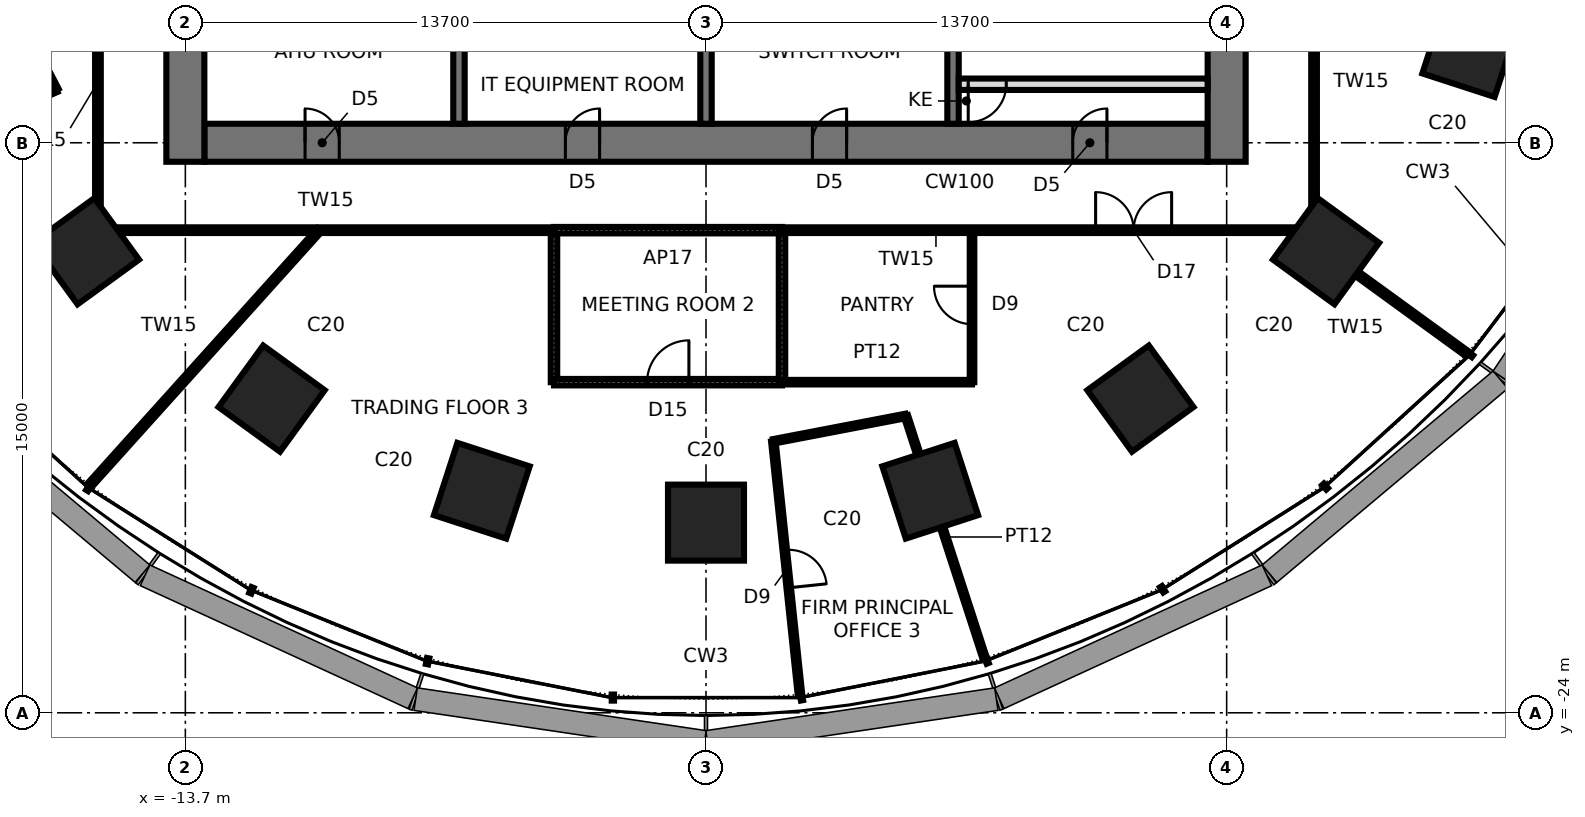
"""IFC4 building model, lengths in metres.
Left out: names, types, materials, properties, quantities, classifications, styles, units other than length and angle.
Written with IfcOpenShell. Run it as: python <this file> out.ifc"""

import sys

from ifc_helpers import new_model, si_unit, direction, frame, frame_2d, origin, origin_2d, place, context, subcontext, project, spatial, rectangle, extrude, element, fill, save


model = new_model("IFC4")
c1 = context("Model", 3, precision=1e-05, world=origin(), true_north=direction((0.0, 1.0)))
c2 = subcontext(c1, "Body", "Model", "MODEL_VIEW")
j1 = project(units=[si_unit("LENGTHUNIT", "METRE"), si_unit("PLANEANGLEUNIT", "RADIAN")], contexts=[c1])
p1 = place(None, origin())
s1 = spatial("IfcSite", under=j1, at=p1, CompositionType="ELEMENT")
p2 = place(p1, origin())
s2 = spatial("IfcBuilding", under=s1, at=p2, CompositionType="ELEMENT")
p3 = place(p2, frame((0.0, 0.0, 65.8)))
s3 = spatial("IfcBuildingStorey", under=s2, at=p3, CompositionType="ELEMENT", Elevation=65.8)
for number, where, z_axis, x_axis in (
    (1, (-16.315, -11.854, 0.0), (0.0, 0.0, 1.0), (-0.809, -0.588, 0.0)),
    (2, (-11.43, -15.733, 0.0), (0.0, 0.0, 1.0), (-0.588, -0.809, 0.0)),
    (3, (-5.9, -18.157, 0.0), (0.0, 0.0, 1.0), (-0.309, -0.951, 0.0)),
    (4, (0.0, -18.996, 0.0), (0.0, 0.0, 1.0), (0.0, -1.0, 0.0)),
    (5, (5.9, -18.157, 0.0), (0.0, 0.0, 1.0), (0.309, -0.951, 0.0)),
    (6, (11.43, -15.733, 0.0), (0.0, 0.0, 1.0), (0.588, -0.809, 0.0)),
    (7, (16.315, -11.854, 0.0), (0.0, 0.0, 1.0), (0.809, -0.588, 0.0)),
    (8, (20.109, -6.534, 0.0), (0.0, 0.0, 1.0), (0.951, -0.309, 0.0)),
):
    element("IfcColumn", number, at=place(p3, frame(where, z_axis=z_axis, x_axis=x_axis)), inside=s3, PredefinedType="COLUMN", context=c2, shape_type="SweptSolid", body=[
        extrude(rectangle(XDim=2.0, YDim=2.0, at=origin_2d()), origin(), (0.0, 0.0, 1.0), 4.2),
    ])
p4 = place(p3, frame((-13.2, -9.0, 0.0), z_axis=(0.0, 0.0, 1.0), x_axis=(1.0, 0.0, 0.0)))
e9 = element("IfcWall", 9, at=p4, inside=s3, PredefinedType="SHEAR", context=c2, shape_type="SweptSolid", body=[
    extrude(rectangle(XDim=26.4, YDim=1.0, at=frame_2d((13.2, 0.0))), origin(), (0.0, 0.0, 1.0), 4.2),
])
p5 = place(p4, frame((2.65, 0.0, 0.0)))
e10 = element("IfcOpeningElement", 10, at=p5, cuts=e9, PredefinedType="OPENING", context=c2, shape_type="SweptSolid", body=[
    extrude(rectangle(XDim=0.9, YDim=2.1, at=frame_2d((0.45, 1.05))), frame((0.0, 0.51, 0.0), z_axis=(0.0, -1.0, 0.0), x_axis=(1.0, 0.0, 0.0)), (0.0, 0.0, 1.0), 1.02),
])
p6 = place(p4, frame((9.5, 0.0, 0.0)))
e11 = element("IfcOpeningElement", 11, at=p6, cuts=e9, PredefinedType="OPENING", context=c2, shape_type="SweptSolid", body=[
    extrude(rectangle(XDim=0.9, YDim=2.1, at=frame_2d((0.45, 1.05))), frame((0.0, 0.51, 0.0), z_axis=(0.0, -1.0, 0.0), x_axis=(1.0, 0.0, 0.0)), (0.0, 0.0, 1.0), 1.02),
])
p7 = place(p4, frame((16.0, 0.0, 0.0)))
e12 = element("IfcOpeningElement", 12, at=p7, cuts=e9, PredefinedType="OPENING", context=c2, shape_type="SweptSolid", body=[
    extrude(rectangle(XDim=0.9, YDim=2.1, at=frame_2d((0.45, 1.05))), frame((0.0, 0.51, 0.0), z_axis=(0.0, -1.0, 0.0), x_axis=(1.0, 0.0, 0.0)), (0.0, 0.0, 1.0), 1.02),
])
p8 = place(p4, frame((22.85, 0.0, 0.0)))
e13 = element("IfcOpeningElement", 13, at=p8, cuts=e9, PredefinedType="OPENING", context=c2, shape_type="SweptSolid", body=[
    extrude(rectangle(XDim=0.9, YDim=2.1, at=frame_2d((0.45, 1.05))), frame((0.0, 0.51, 0.0), z_axis=(0.0, -1.0, 0.0), x_axis=(1.0, 0.0, 0.0)), (0.0, 0.0, 1.0), 1.02),
])
p9 = place(p3, frame((13.7, -9.5, 0.0), z_axis=(0.0, 0.0, 1.0), x_axis=(0.0, 1.0, 0.0)))
e14 = element("IfcWall", 14, at=p9, inside=s3, PredefinedType="SHEAR", context=c2, shape_type="SweptSolid", body=[
    extrude(rectangle(XDim=19.0, YDim=1.0, at=frame_2d((9.5, 0.0))), origin(), (0.0, 0.0, 1.0), 4.2),
])
p10 = place(p9, frame((8.6, 0.0, 0.0)))
e15 = element("IfcOpeningElement", 15, at=p10, cuts=e14, PredefinedType="OPENING", context=c2, shape_type="SweptSolid", body=[
    extrude(rectangle(XDim=1.8, YDim=2.4, at=frame_2d((0.9, 1.2))), frame((0.0, 0.51, 0.0), z_axis=(0.0, -1.0, 0.0), x_axis=(1.0, 0.0, 0.0)), (0.0, 0.0, 1.0), 1.02),
])
p11 = place(p3, frame((-13.7, 9.5, 0.0), z_axis=(0.0, 0.0, 1.0), x_axis=(0.0, -1.0, 0.0)))
e16 = element("IfcWall", 16, at=p11, inside=s3, PredefinedType="SHEAR", context=c2, shape_type="SweptSolid", body=[
    extrude(rectangle(XDim=19.0, YDim=1.0, at=frame_2d((9.5, 0.0))), origin(), (0.0, 0.0, 1.0), 4.2),
])
p12 = place(p11, frame((8.6, 0.0, 0.0)))
e17 = element("IfcOpeningElement", 17, at=p12, cuts=e16, PredefinedType="OPENING", context=c2, shape_type="SweptSolid", body=[
    extrude(rectangle(XDim=1.8, YDim=2.4, at=frame_2d((0.9, 1.2))), frame((0.0, 0.51, 0.0), z_axis=(0.0, -1.0, 0.0), x_axis=(1.0, 0.0, 0.0)), (0.0, 0.0, 1.0), 1.02),
])
for number, where, z_axis, x_axis in (
    (18, (-6.5, -4.75, 0.0), (0.0, 0.0, 1.0), (0.0, -1.0, 0.0)),
    (19, (6.5, -4.75, 0.0), (0.0, 0.0, 1.0), (0.0, -1.0, 0.0)),
    (20, (0.0, -4.75, 0.0), (0.0, 0.0, 1.0), (0.0, -1.0, 0.0)),
):
    element("IfcWall", number, at=place(p3, frame(where, z_axis=z_axis, x_axis=x_axis)), inside=s3, PredefinedType="SHEAR", context=c2, shape_type="SweptSolid", body=[
        extrude(rectangle(XDim=3.75, YDim=0.3, at=frame_2d((1.875, 0.0))), origin(), (0.0, 0.0, 1.0), 4.2),
    ])
p13 = place(p3, frame((6.65, -7.46, 0.0), z_axis=(0.0, 0.0, 1.0), x_axis=(1.0, 0.0, 0.0)))
e21 = element("IfcWall", 21, at=p13, inside=s3, PredefinedType="PARTITIONING", context=c2, shape_type="SweptSolid", body=[
    extrude(rectangle(XDim=6.55, YDim=0.3, at=frame_2d((3.275, 0.0))), origin(), (0.0, 0.0, 1.0), 4.04),
])
p14 = place(p13, frame((0.25, 0.0, 0.0)))
e22 = element("IfcOpeningElement", 22, at=p14, cuts=e21, PredefinedType="OPENING", context=c2, shape_type="SweptSolid", body=[
    extrude(rectangle(XDim=1.0, YDim=2.4, at=frame_2d((0.5, 1.2))), frame((0.0, 0.16, 0.0), z_axis=(0.0, -1.0, 0.0), x_axis=(1.0, 0.0, 0.0)), (0.0, 0.0, 1.0), 0.32),
])
p15 = place(p3, frame((-17.087, -7.608, 0.0), z_axis=(0.0, 0.0, 1.0), x_axis=(-0.462175272874, 0.886788597775, 0.0)))
e23 = element("IfcWall", 23, at=p15, inside=s3, PredefinedType="PARTITIONING", context=c2, shape_type="SweptSolid", body=[
    extrude(rectangle(XDim=4.036, YDim=0.12, at=frame_2d((2.018, 0.0))), origin(), (0.0, 0.0, 1.0), 4.04),
])
p16 = place(p3, frame((-23.208, -10.333, 0.0), z_axis=(0.0, 0.0, 1.0), x_axis=(0.91354990356, 0.406726657235, 0.0)))
e24 = element("IfcWall", 24, at=p16, inside=s3, PredefinedType="PARTITIONING", context=c2, shape_type="SweptSolid", body=[
    extrude(rectangle(XDim=6.7, YDim=0.12, at=frame_2d((3.35, 0.0))), origin(), (0.0, 0.0, 1.0), 4.04),
])
p17 = place(p3, frame((-16.0, -3.5, 0.0), z_axis=(0.0, 0.0, 1.0), x_axis=(0.0, -1.0, 0.0)))
e25 = element("IfcWall", 25, at=p17, inside=s3, PredefinedType="PARTITIONING", context=c2, shape_type="SweptSolid", body=[
    extrude(rectangle(XDim=7.8, YDim=0.15, at=frame_2d((3.9, 0.0))), origin(), (0.0, 0.0, 1.0), 4.04),
])
p18 = place(p3, frame((-10.175, -11.3, 0.0), z_axis=(0.0, 0.0, 1.0), x_axis=(-0.669136564673, -0.743139460544, 0.0)))
e26 = element("IfcWall", 26, at=p18, inside=s3, PredefinedType="PARTITIONING", context=c2, shape_type="SweptSolid", body=[
    extrude(rectangle(XDim=9.026, YDim=0.15, at=frame_2d((4.513, 0.0))), origin(), (0.0, 0.0, 1.0), 4.04),
])
p19 = place(p3, frame((-16.0, -11.3, 0.0), z_axis=(0.0, 0.0, 1.0), x_axis=(1.0, 0.0, 0.0)))
e27 = element("IfcWall", 27, at=p19, inside=s3, PredefinedType="PARTITIONING", context=c2, shape_type="SweptSolid", body=[
    extrude(rectangle(XDim=12.0, YDim=0.15, at=frame_2d((6.0, 0.0))), origin(), (0.0, 0.0, 1.0), 4.04),
])
p20 = place(p3, frame((-4.0, -11.3, 0.0), z_axis=(0.0, 0.0, 1.0), x_axis=(0.0, -1.0, 0.0)))
e28 = element("IfcWall", 28, at=p20, inside=s3, PredefinedType="PARTITIONING", context=c2, shape_type="SweptSolid", body=[
    extrude(rectangle(XDim=4.0, YDim=0.17, at=frame_2d((2.0, 0.0))), origin(), (0.0, 0.0, 1.0), 4.04),
])
p21 = place(p3, frame((2.0, -11.3, 0.0), z_axis=(0.0, 0.0, 1.0), x_axis=(-1.0, 0.0, 0.0)))
e29 = element("IfcWall", 29, at=p21, inside=s3, PredefinedType="PARTITIONING", context=c2, shape_type="SweptSolid", body=[
    extrude(rectangle(XDim=6.0, YDim=0.17, at=frame_2d((3.0, 0.0))), origin(), (0.0, 0.0, 1.0), 4.04),
])
p22 = place(p3, frame((-4.0, -15.3, 0.0), z_axis=(0.0, 0.0, 1.0), x_axis=(1.0, 0.0, 0.0)))
e30 = element("IfcWall", 30, at=p22, inside=s3, PredefinedType="PARTITIONING", context=c2, shape_type="SweptSolid", body=[
    extrude(rectangle(XDim=6.0, YDim=0.17, at=frame_2d((3.0, 0.0))), origin(), (0.0, 0.0, 1.0), 3.586),
])
p23 = place(p22, frame((2.45, 0.0, 0.0)))
e31 = element("IfcOpeningElement", 31, at=p23, cuts=e30, PredefinedType="OPENING", context=c2, shape_type="SweptSolid", body=[
    extrude(rectangle(XDim=1.1, YDim=2.4, at=frame_2d((0.55, 1.2))), frame((0.0, 0.095, 0.0), z_axis=(0.0, -1.0, 0.0), x_axis=(1.0, 0.0, 0.0)), (0.0, 0.0, 1.0), 0.19),
])
p24 = place(p3, frame((1.772, -16.857, 0.0), z_axis=(0.0, 0.0, 1.0), x_axis=(0.104542522915, -0.994520417539, 0.0)))
e32 = element("IfcWall", 32, at=p24, inside=s3, PredefinedType="PARTITIONING", context=c2, shape_type="SweptSolid", body=[
    extrude(rectangle(XDim=6.7, YDim=0.12, at=frame_2d((3.35, 0.0))), origin(), (0.0, 0.0, 1.0), 4.04),
])
p25 = place(p24, frame((2.875, 0.0, 0.0)))
e33 = element("IfcOpeningElement", 33, at=p25, cuts=e32, PredefinedType="OPENING", context=c2, shape_type="SweptSolid", body=[
    extrude(rectangle(XDim=1.0, YDim=2.4, at=frame_2d((0.5, 1.2))), frame((0.0, 0.07, 0.0), z_axis=(0.0, -1.0, 0.0), x_axis=(1.0, 0.0, 0.0)), (0.0, 0.0, 1.0), 0.14),
])
p26 = place(p3, frame((2.0, -11.3, 0.0), z_axis=(0.0, 0.0, 1.0), x_axis=(0.0, -1.0, 0.0)))
e34 = element("IfcWall", 34, at=p26, inside=s3, PredefinedType="PARTITIONING", context=c2, shape_type="SweptSolid", body=[
    extrude(rectangle(XDim=4.0, YDim=0.17, at=frame_2d((2.0, 0.0))), origin(), (0.0, 0.0, 1.0), 4.04),
])
p27 = place(p3, frame((5.26, -16.188, 0.0), z_axis=(0.0, 0.0, 1.0), x_axis=(-0.982089213151, -0.188416499842, 0.0)))
e35 = element("IfcWall", 35, at=p27, inside=s3, PredefinedType="PARTITIONING", context=c2, shape_type="SweptSolid", body=[
    extrude(rectangle(XDim=3.552, YDim=0.12, at=frame_2d((1.776, 0.0))), origin(), (0.0, 0.0, 1.0), 4.04),
])
p28 = place(p3, frame((2.0, -15.3, 0.0), z_axis=(0.0, 0.0, 1.0), x_axis=(1.0, 0.0, 0.0)))
e36 = element("IfcWall", 36, at=p28, inside=s3, PredefinedType="PARTITIONING", context=c2, shape_type="SweptSolid", body=[
    extrude(rectangle(XDim=5.0, YDim=0.12, at=frame_2d((2.5, 0.0))), origin(), (0.0, 0.0, 1.0), 3.586),
])
p29 = place(p3, frame((7.33, -22.56, 0.0), z_axis=(0.0, 0.0, 1.0), x_axis=(-0.309003676349, 0.951060843481, 0.0)))
e37 = element("IfcWall", 37, at=p29, inside=s3, PredefinedType="PARTITIONING", context=c2, shape_type="SweptSolid", body=[
    extrude(rectangle(XDim=6.7, YDim=0.12, at=frame_2d((3.35, 0.0))), origin(), (0.0, 0.0, 1.0), 2.84),
])
p30 = place(p3, frame((7.0, -15.3, 0.0), z_axis=(0.0, 0.0, 1.0), x_axis=(0.0, 1.0, 0.0)))
e38 = element("IfcWall", 38, at=p30, inside=s3, PredefinedType="PARTITIONING", context=c2, shape_type="SweptSolid", body=[
    extrude(rectangle(XDim=4.0, YDim=0.12, at=frame_2d((2.0, 0.0))), origin(), (0.0, 0.0, 1.0), 4.04),
])
p31 = place(p30, frame((1.526, 0.0, 0.0)))
e39 = element("IfcOpeningElement", 39, at=p31, cuts=e38, PredefinedType="OPENING", context=c2, shape_type="SweptSolid", body=[
    extrude(rectangle(XDim=1.0, YDim=2.4, at=frame_2d((0.5, 1.2))), frame((0.0, 0.07, 0.0), z_axis=(0.0, -1.0, 0.0), x_axis=(1.0, 0.0, 0.0)), (0.0, 0.0, 1.0), 0.14),
])
p32 = place(p3, frame((2.0, -11.3, 0.0), z_axis=(0.0, 0.0, 1.0), x_axis=(1.0, 0.0, 0.0)))
e40 = element("IfcWall", 40, at=p32, inside=s3, PredefinedType="PARTITIONING", context=c2, shape_type="SweptSolid", body=[
    extrude(rectangle(XDim=14.0, YDim=0.15, at=frame_2d((7.0, 0.0))), origin(), (0.0, 0.0, 1.0), 4.04),
])
p33 = place(p32, frame((8.252, 0.0, 0.0)))
e41 = element("IfcOpeningElement", 41, at=p33, cuts=e40, PredefinedType="OPENING", context=c2, shape_type="SweptSolid", body=[
    extrude(rectangle(XDim=2.0, YDim=2.4, at=frame_2d((1.0, 1.2))), frame((0.0, 0.085, 0.0), z_axis=(0.0, -1.0, 0.0), x_axis=(1.0, 0.0, 0.0)), (0.0, 0.0, 1.0), 0.17),
])
p34 = place(p3, frame((15.553, -11.3, 0.0), z_axis=(0.0, 0.0, 1.0), x_axis=(0.809032304237, -0.587764179499, 0.0)))
e42 = element("IfcWall", 42, at=p34, inside=s3, PredefinedType="PARTITIONING", context=c2, shape_type="SweptSolid", body=[
    extrude(rectangle(XDim=5.522, YDim=0.15, at=frame_2d((2.761, 0.0))), origin(), (0.0, 0.0, 1.0), 2.84),
])
p35 = place(p3, frame((16.0, -11.3, 0.0), z_axis=(0.0, 0.0, 1.0), x_axis=(0.0, 1.0, 0.0)))
e43 = element("IfcWall", 43, at=p35, inside=s3, PredefinedType="PARTITIONING", context=c2, shape_type="SweptSolid", body=[
    extrude(rectangle(XDim=7.8, YDim=0.15, at=frame_2d((3.9, 0.0))), origin(), (0.0, 0.0, 1.0), 4.04),
])
p36 = place(p5, origin())
e44 = element("IfcDoor", 44, at=p36, inside=s3, OperationType="SINGLE_SWING_LEFT", PredefinedType="DOOR", context=c2, shape_type="SweptSolid", body=[
    extrude(rectangle(XDim=0.82, YDim=2.06, at=frame_2d((0.45, 1.03))), frame((0.0, 0.025, 0.0), z_axis=(0.0, -1.0, 0.0), x_axis=(1.0, 0.0, 0.0)), (0.0, 0.0, 1.0), 0.05),
    extrude(rectangle(XDim=0.04, YDim=2.1, at=frame_2d((0.02, 1.05))), frame((0.0, 0.25, 0.0), z_axis=(0.0, -1.0, 0.0), x_axis=(1.0, 0.0, 0.0)), (0.0, 0.0, 1.0), 0.5),
    extrude(rectangle(XDim=0.04, YDim=2.1, at=frame_2d((0.88, 1.05))), frame((0.0, 0.25, 0.0), z_axis=(0.0, -1.0, 0.0), x_axis=(1.0, 0.0, 0.0)), (0.0, 0.0, 1.0), 0.5),
    extrude(rectangle(XDim=0.82, YDim=0.04, at=frame_2d((0.45, 2.08))), frame((0.0, 0.25, 0.0), z_axis=(0.0, -1.0, 0.0), x_axis=(1.0, 0.0, 0.0)), (0.0, 0.0, 1.0), 0.5),
])
fill(e10, e44)
p37 = place(p6, origin())
e45 = element("IfcDoor", 45, at=p37, inside=s3, OperationType="SINGLE_SWING_RIGHT", PredefinedType="DOOR", context=c2, shape_type="SweptSolid", body=[
    extrude(rectangle(XDim=0.82, YDim=2.06, at=frame_2d((0.45, 1.03))), frame((0.0, 0.025, 0.0), z_axis=(0.0, -1.0, 0.0), x_axis=(1.0, 0.0, 0.0)), (0.0, 0.0, 1.0), 0.05),
    extrude(rectangle(XDim=0.04, YDim=2.1, at=frame_2d((0.02, 1.05))), frame((0.0, 0.25, 0.0), z_axis=(0.0, -1.0, 0.0), x_axis=(1.0, 0.0, 0.0)), (0.0, 0.0, 1.0), 0.5),
    extrude(rectangle(XDim=0.04, YDim=2.1, at=frame_2d((0.88, 1.05))), frame((0.0, 0.25, 0.0), z_axis=(0.0, -1.0, 0.0), x_axis=(1.0, 0.0, 0.0)), (0.0, 0.0, 1.0), 0.5),
    extrude(rectangle(XDim=0.82, YDim=0.04, at=frame_2d((0.45, 2.08))), frame((0.0, 0.25, 0.0), z_axis=(0.0, -1.0, 0.0), x_axis=(1.0, 0.0, 0.0)), (0.0, 0.0, 1.0), 0.5),
])
fill(e11, e45)
p38 = place(p7, origin())
e46 = element("IfcDoor", 46, at=p38, inside=s3, OperationType="SINGLE_SWING_RIGHT", PredefinedType="DOOR", context=c2, shape_type="SweptSolid", body=[
    extrude(rectangle(XDim=0.82, YDim=2.06, at=frame_2d((0.45, 1.03))), frame((0.0, 0.025, 0.0), z_axis=(0.0, -1.0, 0.0), x_axis=(1.0, 0.0, 0.0)), (0.0, 0.0, 1.0), 0.05),
    extrude(rectangle(XDim=0.04, YDim=2.1, at=frame_2d((0.02, 1.05))), frame((0.0, 0.25, 0.0), z_axis=(0.0, -1.0, 0.0), x_axis=(1.0, 0.0, 0.0)), (0.0, 0.0, 1.0), 0.5),
    extrude(rectangle(XDim=0.04, YDim=2.1, at=frame_2d((0.88, 1.05))), frame((0.0, 0.25, 0.0), z_axis=(0.0, -1.0, 0.0), x_axis=(1.0, 0.0, 0.0)), (0.0, 0.0, 1.0), 0.5),
    extrude(rectangle(XDim=0.82, YDim=0.04, at=frame_2d((0.45, 2.08))), frame((0.0, 0.25, 0.0), z_axis=(0.0, -1.0, 0.0), x_axis=(1.0, 0.0, 0.0)), (0.0, 0.0, 1.0), 0.5),
])
fill(e12, e46)
p39 = place(p8, origin())
e47 = element("IfcDoor", 47, at=p39, inside=s3, OperationType="SINGLE_SWING_RIGHT", PredefinedType="DOOR", context=c2, shape_type="SweptSolid", body=[
    extrude(rectangle(XDim=0.82, YDim=2.06, at=frame_2d((0.45, 1.03))), frame((0.0, 0.025, 0.0), z_axis=(0.0, -1.0, 0.0), x_axis=(1.0, 0.0, 0.0)), (0.0, 0.0, 1.0), 0.05),
    extrude(rectangle(XDim=0.04, YDim=2.1, at=frame_2d((0.02, 1.05))), frame((0.0, 0.25, 0.0), z_axis=(0.0, -1.0, 0.0), x_axis=(1.0, 0.0, 0.0)), (0.0, 0.0, 1.0), 0.5),
    extrude(rectangle(XDim=0.04, YDim=2.1, at=frame_2d((0.88, 1.05))), frame((0.0, 0.25, 0.0), z_axis=(0.0, -1.0, 0.0), x_axis=(1.0, 0.0, 0.0)), (0.0, 0.0, 1.0), 0.5),
    extrude(rectangle(XDim=0.82, YDim=0.04, at=frame_2d((0.45, 2.08))), frame((0.0, 0.25, 0.0), z_axis=(0.0, -1.0, 0.0), x_axis=(1.0, 0.0, 0.0)), (0.0, 0.0, 1.0), 0.5),
])
fill(e13, e47)
p40 = place(p14, frame((1.0, 0.0, 0.0), z_axis=(0.0, 0.0, 1.0), x_axis=(-1.0, 0.0, 0.0)))
e48 = element("IfcDoor", 48, at=p40, inside=s3, OperationType="SINGLE_SWING_RIGHT", PredefinedType="DOOR", context=c2, shape_type="SweptSolid", body=[
    extrude(rectangle(XDim=1.0, YDim=2.4, at=frame_2d((0.5, 1.2))), frame((0.0, 0.025, 0.0), z_axis=(0.0, -1.0, 0.0), x_axis=(1.0, 0.0, 0.0)), (0.0, 0.0, 1.0), 0.05),
])
fill(e22, e48)
p41 = place(p25, origin())
e49 = element("IfcDoor", 49, at=p41, inside=s3, OperationType="SINGLE_SWING_RIGHT", PredefinedType="DOOR", context=c2, shape_type="SweptSolid", body=[
    extrude(rectangle(XDim=1.0, YDim=2.4, at=frame_2d((0.5, 1.2))), frame((0.0, 0.025, 0.0), z_axis=(0.0, -1.0, 0.0), x_axis=(1.0, 0.0, 0.0)), (0.0, 0.0, 1.0), 0.05),
])
fill(e33, e49)
p42 = place(p23, origin())
e50 = element("IfcDoor", 50, at=p42, inside=s3, OperationType="SINGLE_SWING_RIGHT", PredefinedType="DOOR", context=c2, shape_type="SweptSolid", body=[
    extrude(rectangle(XDim=1.1, YDim=2.4, at=frame_2d((0.55, 1.2))), frame((0.0, 0.025, 0.0), z_axis=(0.0, -1.0, 0.0), x_axis=(1.0, 0.0, 0.0)), (0.0, 0.0, 1.0), 0.05),
])
fill(e31, e50)
p43 = place(p31, origin())
e51 = element("IfcDoor", 51, at=p43, inside=s3, OperationType="SINGLE_SWING_RIGHT", PredefinedType="DOOR", context=c2, shape_type="SweptSolid", body=[
    extrude(rectangle(XDim=1.0, YDim=2.4, at=frame_2d((0.5, 1.2))), frame((0.0, 0.025, 0.0), z_axis=(0.0, -1.0, 0.0), x_axis=(1.0, 0.0, 0.0)), (0.0, 0.0, 1.0), 0.05),
])
fill(e39, e51)
p44 = place(p33, origin())
e52 = element("IfcDoor", 52, at=p44, inside=s3, OperationType="DOUBLE_DOOR_SINGLE_SWING", PredefinedType="DOOR", context=c2, shape_type="SweptSolid", body=[
    extrude(rectangle(XDim=2.0, YDim=2.4, at=frame_2d((1.0, 1.2))), frame((0.0, 0.025, 0.0), z_axis=(0.0, -1.0, 0.0), x_axis=(1.0, 0.0, 0.0)), (0.0, 0.0, 1.0), 0.05),
])
fill(e41, e52)
save(model, sys.argv[1])
